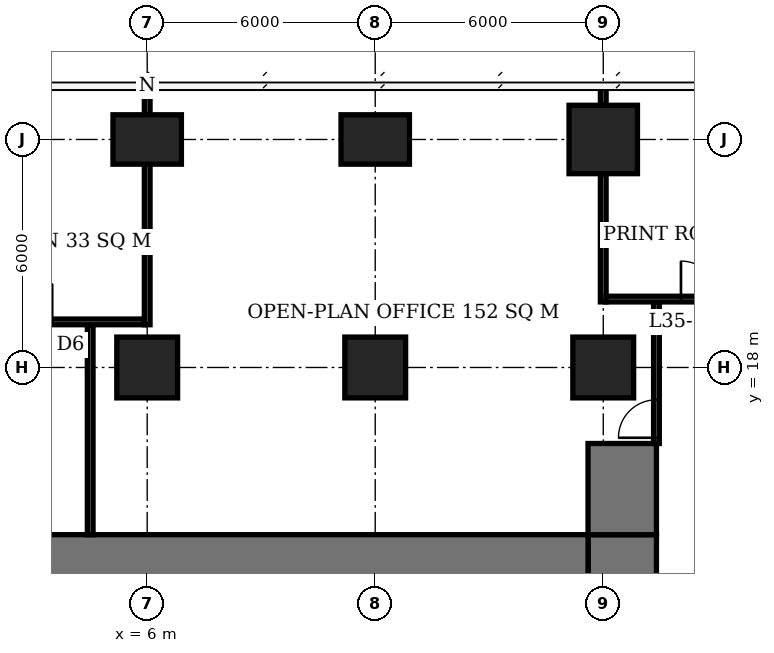
"""IFC4 building model, lengths in metres.
Left out: names, types, materials, properties, quantities, classifications, styles, units other than length and angle.
Written with IfcOpenShell. Run it as: python <this file> out.ifc"""

import sys

from ifc_helpers import new_model, si_unit, direction, frame, frame_2d, origin, origin_2d, place, context, subcontext, project, spatial, rectangle, extrude, element, fill, save


model = new_model("IFC4")
c1 = context("Model", 3, precision=1e-05, world=origin(), true_north=direction((0.0, 1.0)))
c2 = subcontext(c1, "Body", "Model", "MODEL_VIEW")
j1 = project(units=[si_unit("LENGTHUNIT", "METRE"), si_unit("PLANEANGLEUNIT", "RADIAN")], contexts=[c1])
p1 = place(None, origin())
s1 = spatial("IfcSite", under=j1, at=p1, CompositionType="ELEMENT")
p2 = place(p1, origin())
s2 = spatial("IfcBuilding", under=s1, at=p2, CompositionType="ELEMENT")
p3 = place(p2, frame((0.0, 0.0, 144.5)))
s3 = spatial("IfcBuildingStorey", under=s2, at=p3, CompositionType="ELEMENT", Elevation=144.5)
p4 = place(p3, frame((6.0, 18.0, 0.0), z_axis=(0.0, 0.0, 1.0), x_axis=(1.0, 0.0, 0.0)))
e1 = element("IfcColumn", 1, at=p4, inside=s3, PredefinedType="COLUMN", context=c2, shape_type="SweptSolid", body=[
    extrude(rectangle(XDim=1.6, YDim=1.6, at=origin_2d()), origin(), (0.0, 0.0, 1.0), 3.9),
])
p5 = place(p3, frame((6.0, 24.0, 0.0), z_axis=(0.0, 0.0, 1.0), x_axis=(1.0, 0.0, 0.0)))
e2 = element("IfcColumn", 2, at=p5, inside=s3, PredefinedType="COLUMN", context=c2, shape_type="SweptSolid", body=[
    extrude(rectangle(XDim=1.8, YDim=1.3, at=origin_2d()), origin(), (0.0, 0.0, 1.0), 3.9),
])
p6 = place(p3, frame((12.0, 18.0, 0.0), z_axis=(0.0, 0.0, 1.0), x_axis=(1.0, 0.0, 0.0)))
e3 = element("IfcColumn", 3, at=p6, inside=s3, PredefinedType="COLUMN", context=c2, shape_type="SweptSolid", body=[
    extrude(rectangle(XDim=1.6, YDim=1.6, at=origin_2d()), origin(), (0.0, 0.0, 1.0), 3.9),
])
p7 = place(p3, frame((12.0, 24.0, 0.0), z_axis=(0.0, 0.0, 1.0), x_axis=(1.0, 0.0, 0.0)))
e4 = element("IfcColumn", 4, at=p7, inside=s3, PredefinedType="COLUMN", context=c2, shape_type="SweptSolid", body=[
    extrude(rectangle(XDim=1.8, YDim=1.3, at=origin_2d()), origin(), (0.0, 0.0, 1.0), 3.9),
])
p8 = place(p3, frame((18.0, 18.0, 0.0), z_axis=(0.0, 0.0, 1.0), x_axis=(1.0, 0.0, 0.0)))
e5 = element("IfcColumn", 5, at=p8, inside=s3, PredefinedType="COLUMN", context=c2, shape_type="SweptSolid", body=[
    extrude(rectangle(XDim=1.6, YDim=1.6, at=origin_2d()), origin(), (0.0, 0.0, 1.0), 3.9),
])
p9 = place(p3, frame((18.0, 24.0, 0.0), z_axis=(0.0, 0.0, 1.0), x_axis=(1.0, 0.0, 0.0)))
e6 = element("IfcColumn", 6, at=p9, inside=s3, PredefinedType="COLUMN", context=c2, shape_type="SweptSolid", body=[
    extrude(rectangle(XDim=1.8, YDim=1.8, at=origin_2d()), origin(), (0.0, 0.0, 1.0), 3.9),
])
p10 = place(p3, frame((-5.6, 12.6, 0.0), z_axis=(0.0, 0.0, 1.0), x_axis=(1.0, 0.0, 0.0)))
e7 = element("IfcWall", 7, at=p10, inside=s3, PredefinedType="SHEAR", context=c2, shape_type="SweptSolid", body=[
    extrude(rectangle(XDim=23.2, YDim=2.0, at=frame_2d((11.6, 0.0))), origin(), (0.0, 0.0, 1.0), 3.9),
])
p11 = place(p3, frame((18.5, -7.6, 0.0), z_axis=(0.0, 0.0, 1.0), x_axis=(0.0, 1.0, 0.0)))
e8 = element("IfcWall", 8, at=p11, inside=s3, PredefinedType="SHEAR", context=c2, shape_type="SweptSolid", body=[
    extrude(rectangle(XDim=21.2, YDim=1.8, at=frame_2d((10.6, 0.0))), origin(), (0.0, 0.0, 1.0), 3.9),
])
p12 = place(p11, frame((9.2, 0.0, 0.0)))
e9 = element("IfcOpeningElement", 9, at=p12, cuts=e8, PredefinedType="OPENING", context=c2, shape_type="SweptSolid", body=[
    extrude(rectangle(XDim=1.8, YDim=2.4, at=frame_2d((0.9, 1.2))), frame((0.0, 0.91, 0.0), z_axis=(0.0, -1.0, 0.0), x_axis=(1.0, 0.0, 0.0)), (0.0, 0.0, 1.0), 1.82),
])
p13 = place(p3, frame((18.5, 13.6, 0.0), z_axis=(0.0, 0.0, 1.0), x_axis=(0.0, 1.0, 0.0)))
e10 = element("IfcWall", 10, at=p13, inside=s3, PredefinedType="SHEAR", context=c2, shape_type="SweptSolid", body=[
    extrude(rectangle(XDim=2.4, YDim=1.8, at=frame_2d((1.2, 0.0))), origin(), (0.0, 0.0, 1.0), 3.9),
])
p14 = place(p3, frame((0.075, 19.2, 0.0), z_axis=(0.0, 0.0, 1.0), x_axis=(1.0, 0.0, 0.0)))
e11 = element("IfcWall", 11, at=p14, inside=s3, PredefinedType="PARTITIONING", context=c2, shape_type="SweptSolid", body=[
    extrude(rectangle(XDim=5.85, YDim=0.15, at=frame_2d((2.925, 0.0))), origin(), (0.0, 0.0, 1.0), 3.65),
])
p15 = place(p14, frame((2.425, 0.0, 0.0)))
e12 = element("IfcOpeningElement", 12, at=p15, cuts=e11, PredefinedType="OPENING", context=c2, shape_type="SweptSolid", body=[
    extrude(rectangle(XDim=1.0, YDim=2.1, at=frame_2d((0.5, 1.05))), frame((0.0, 0.085, 0.0), z_axis=(0.0, -1.0, 0.0), x_axis=(1.0, 0.0, 0.0)), (0.0, 0.0, 1.0), 0.17),
])
p16 = place(p3, frame((18.075, 19.8, 0.0), z_axis=(0.0, 0.0, 1.0), x_axis=(1.0, 0.0, 0.0)))
e13 = element("IfcWall", 13, at=p16, inside=s3, PredefinedType="PARTITIONING", context=c2, shape_type="SweptSolid", body=[
    extrude(rectangle(XDim=5.015, YDim=0.15, at=frame_2d((2.508, 0.0))), origin(), (0.0, 0.0, 1.0), 3.65),
])
p17 = place(p16, frame((1.97, 0.0, 0.0)))
e14 = element("IfcOpeningElement", 14, at=p17, cuts=e13, PredefinedType="OPENING", context=c2, shape_type="SweptSolid", body=[
    extrude(rectangle(XDim=1.0, YDim=2.1, at=frame_2d((0.5, 1.05))), frame((0.0, 0.085, 0.0), z_axis=(0.0, -1.0, 0.0), x_axis=(1.0, 0.0, 0.0)), (0.0, 0.0, 1.0), 0.17),
])
p18 = place(p3, frame((6.0, 19.125, 0.0), z_axis=(0.0, 0.0, 1.0), x_axis=(0.0, 1.0, 0.0)))
e15 = element("IfcWall", 15, at=p18, inside=s3, PredefinedType="PARTITIONING", context=c2, shape_type="SweptSolid", body=[
    extrude(rectangle(XDim=4.225, YDim=0.15, at=frame_2d((2.113, 0.0))), origin(), (0.0, 0.0, 1.0), 3.65),
])
p19 = place(p3, frame((6.0, 24.65, 0.0), z_axis=(0.0, 0.0, 1.0), x_axis=(0.0, 1.0, 0.0)))
e16 = element("IfcWall", 16, at=p19, inside=s3, PredefinedType="PARTITIONING", context=c2, shape_type="SweptSolid", body=[
    extrude(rectangle(XDim=0.7, YDim=0.15, at=frame_2d((0.35, 0.0))), origin(), (0.0, 0.0, 1.0), 3.65),
])
p20 = place(p3, frame((18.0, 19.725, 0.0), z_axis=(0.0, 0.0, 1.0), x_axis=(0.0, 1.0, 0.0)))
e17 = element("IfcWall", 17, at=p20, inside=s3, PredefinedType="PARTITIONING", context=c2, shape_type="SweptSolid", body=[
    extrude(rectangle(XDim=3.375, YDim=0.15, at=frame_2d((1.688, 0.0))), origin(), (0.0, 0.0, 1.0), 3.65),
])
p21 = place(p3, frame((18.0, 24.9, 0.0), z_axis=(0.0, 0.0, 1.0), x_axis=(0.0, 1.0, 0.0)))
e18 = element("IfcWall", 18, at=p21, inside=s3, PredefinedType="PARTITIONING", context=c2, shape_type="SweptSolid", body=[
    extrude(rectangle(XDim=0.5, YDim=0.15, at=frame_2d((0.25, 0.0))), origin(), (0.0, 0.0, 1.0), 3.65),
])
p22 = place(p3, frame((4.5, 13.6, 0.0), z_axis=(0.0, 0.0, 1.0), x_axis=(0.0, 1.0, 0.0)))
e19 = element("IfcWall", 19, at=p22, inside=s3, PredefinedType="PARTITIONING", context=c2, shape_type="SweptSolid", body=[
    extrude(rectangle(XDim=5.525, YDim=0.15, at=frame_2d((2.762, 0.0))), origin(), (0.0, 0.0, 1.0), 3.65),
])
p23 = place(p3, frame((19.4, 16.0, 0.0), z_axis=(0.0, 0.0, 1.0), x_axis=(0.0, 1.0, 0.0)))
e20 = element("IfcWall", 20, at=p23, inside=s3, PredefinedType="PARTITIONING", context=c2, shape_type="SweptSolid", body=[
    extrude(rectangle(XDim=3.725, YDim=0.15, at=frame_2d((1.863, 0.0))), origin(), (0.0, 0.0, 1.0), 3.65),
])
p24 = place(p23, frame((0.15, 0.0, 0.0)))
e21 = element("IfcOpeningElement", 21, at=p24, cuts=e20, PredefinedType="OPENING", context=c2, shape_type="SweptSolid", body=[
    extrude(rectangle(XDim=1.0, YDim=2.1, at=frame_2d((0.5, 1.05))), frame((0.0, 0.085, 0.0), z_axis=(0.0, -1.0, 0.0), x_axis=(1.0, 0.0, 0.0)), (0.0, 0.0, 1.0), 0.17),
])
p25 = place(p17, origin())
e22 = element("IfcDoor", 22, at=p25, inside=s3, OperationType="SINGLE_SWING_LEFT", PredefinedType="DOOR", context=c2, shape_type="SweptSolid", body=[
    extrude(rectangle(XDim=1.0, YDim=2.1, at=frame_2d((0.5, 1.05))), frame((0.0, 0.025, 0.0), z_axis=(0.0, -1.0, 0.0), x_axis=(1.0, 0.0, 0.0)), (0.0, 0.0, 1.0), 0.05),
])
fill(e14, e22)
p26 = place(p24, origin())
e23 = element("IfcDoor", 23, at=p26, inside=s3, OperationType="SINGLE_SWING_LEFT", PredefinedType="DOOR", context=c2, shape_type="SweptSolid", body=[
    extrude(rectangle(XDim=1.0, YDim=2.1, at=frame_2d((0.5, 1.05))), frame((0.0, 0.025, 0.0), z_axis=(0.0, -1.0, 0.0), x_axis=(1.0, 0.0, 0.0)), (0.0, 0.0, 1.0), 0.05),
])
fill(e21, e23)
save(model, sys.argv[1])
